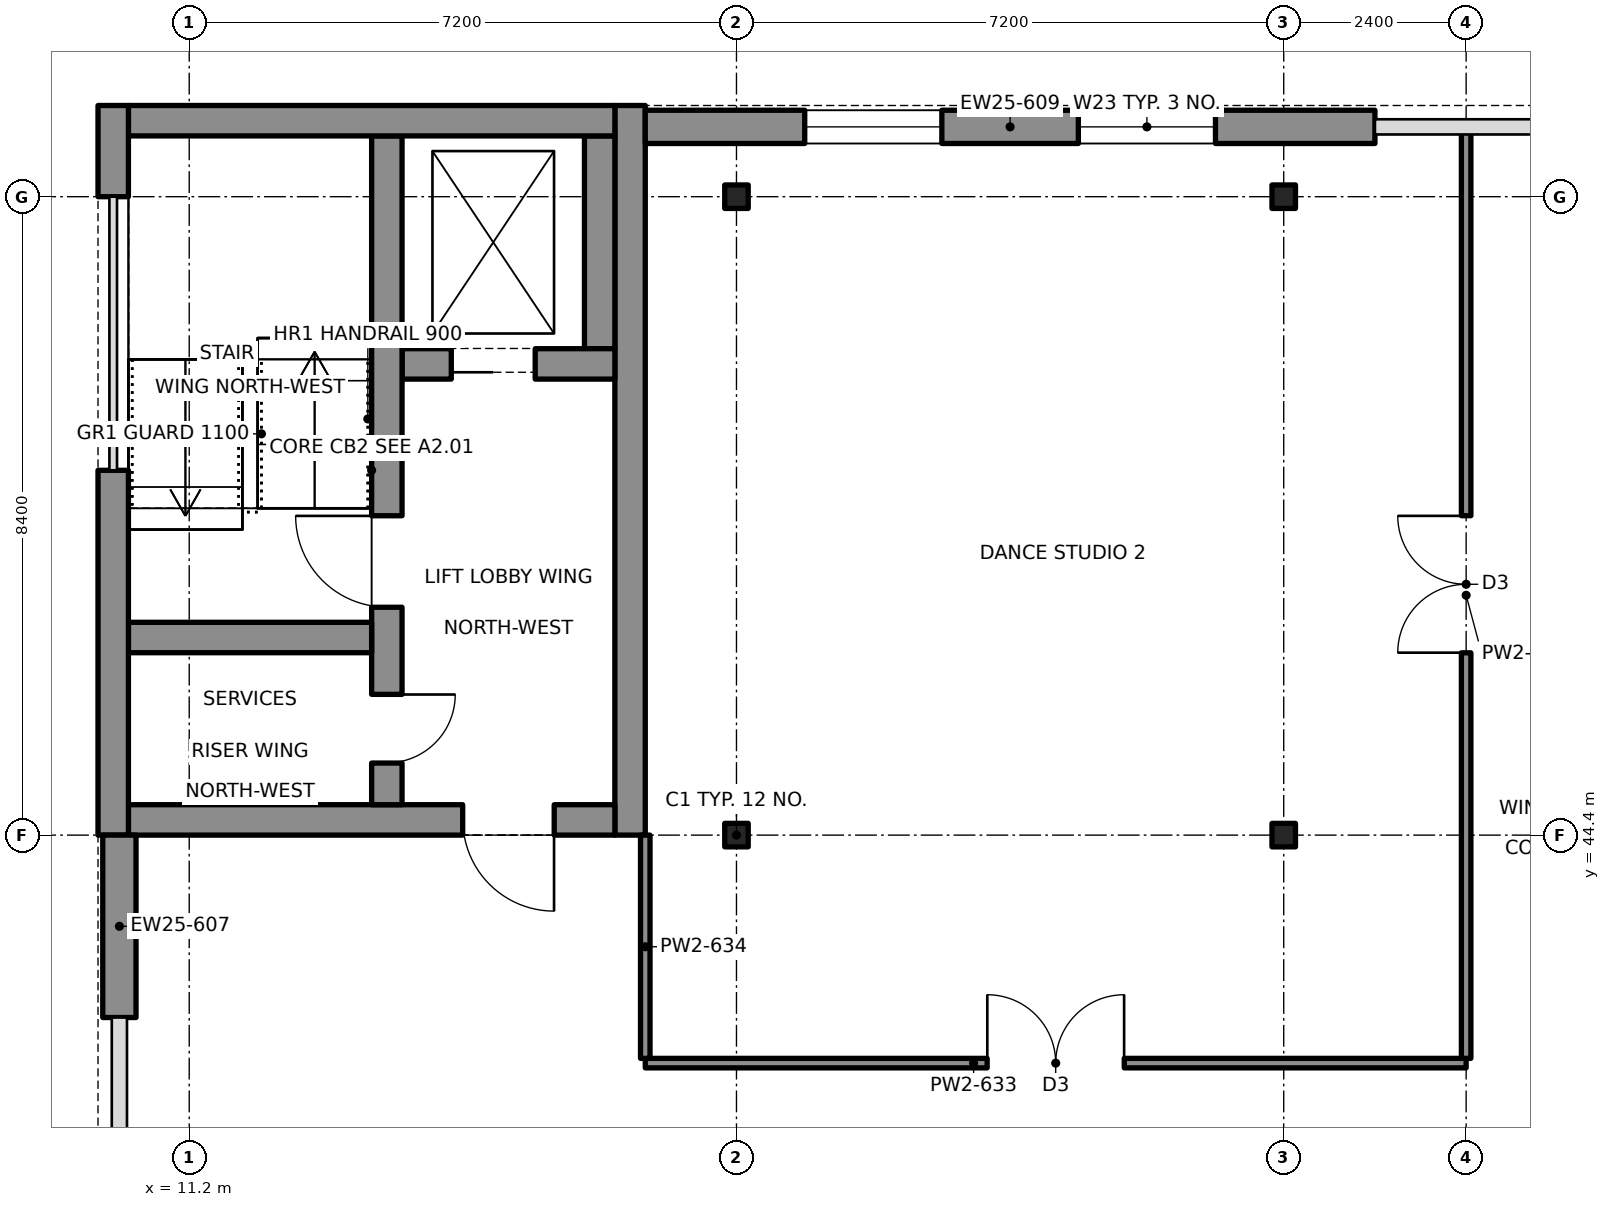
"""IFC4 building model, lengths in metres.
Left out: names, types, materials, properties, quantities, classifications, styles, units other than length and angle.
Written with IfcOpenShell. Run it as: python <this file> out.ifc"""

import sys

from ifc_helpers import new_model, si_unit, direction, frame, frame_2d, origin, origin_2d, place, context, subcontext, project, spatial, rectangle, i_section, extrude, element, fill, save


model = new_model("IFC4")
c1 = context("Model", 3, precision=1e-05, world=origin(), true_north=direction((0.0, 1.0)))
c2 = subcontext(c1, "Body", "Model", "MODEL_VIEW")
j1 = project(units=[si_unit("LENGTHUNIT", "METRE"), si_unit("PLANEANGLEUNIT", "RADIAN")], contexts=[c1])
p1 = place(None, origin())
s1 = spatial("IfcSite", under=j1, at=p1, CompositionType="ELEMENT")
p2 = place(p1, origin())
s2 = spatial("IfcBuilding", under=s1, at=p2, CompositionType="ELEMENT")
p3 = place(p2, frame((0.0, 0.0, 8.8)))
s3 = spatial("IfcBuildingStorey", under=s2, at=p3, CompositionType="ELEMENT", Elevation=8.8)
for number, where, z_axis, x_axis in (
    (1, (18.4, 44.4, 0.0), (0.0, 0.0, 1.0), (1.0, 0.0, 0.0)),
    (2, (18.4, 52.8, 0.0), (0.0, 0.0, 1.0), (1.0, 0.0, 0.0)),
    (3, (25.6, 44.4, 0.0), (0.0, 0.0, 1.0), (1.0, 0.0, 0.0)),
    (4, (25.6, 52.8, 0.0), (0.0, 0.0, 1.0), (1.0, 0.0, 0.0)),
):
    element("IfcColumn", number, at=place(p3, frame(where, z_axis=z_axis, x_axis=x_axis)), inside=s3, PredefinedType="COLUMN", context=c2, shape_type="SweptSolid", body=[
        extrude(i_section(OverallWidth=0.309, OverallDepth=0.323, WebThickness=0.014, FlangeThickness=0.023, at=origin_2d()), origin(), (0.0, 0.0, 1.0), 5.2),
    ])
p4 = place(p3, frame((17.2, 53.719, 0.0), z_axis=(0.0, 0.0, 1.0), x_axis=(1.0, 0.0, 0.0)))
e5 = element("IfcWall", 5, at=p4, inside=s3, PredefinedType="SOLIDWALL", context=c2, shape_type="SweptSolid", body=[
    extrude(rectangle(XDim=9.6, YDim=0.438, at=frame_2d((4.8, 0.0))), origin(), (0.0, 0.0, 1.0), 5.2),
])
p5 = place(p4, frame((2.1, 0.0, 0.8)))
e6 = element("IfcOpeningElement", 6, at=p5, cuts=e5, PredefinedType="OPENING", context=c2, shape_type="SweptSolid", body=[
    extrude(rectangle(XDim=1.8, YDim=3.6, at=frame_2d((0.9, 1.8))), frame((0.0, 0.229, 0.0), z_axis=(0.0, -1.0, 0.0), x_axis=(1.0, 0.0, 0.0)), (0.0, 0.0, 1.0), 0.458),
])
p6 = place(p4, frame((5.7, 0.0, 0.8)))
e7 = element("IfcOpeningElement", 7, at=p6, cuts=e5, PredefinedType="OPENING", context=c2, shape_type="SweptSolid", body=[
    extrude(rectangle(XDim=1.8, YDim=3.6, at=frame_2d((0.9, 1.8))), frame((0.0, 0.229, 0.0), z_axis=(0.0, -1.0, 0.0), x_axis=(1.0, 0.0, 0.0)), (0.0, 0.0, 1.0), 0.458),
])
p7 = place(p3, frame((10.281, 42.0, 0.0), z_axis=(0.0, 0.0, 1.0), x_axis=(0.0, 1.0, 0.0)))
e8 = element("IfcWall", 8, at=p7, inside=s3, PredefinedType="SOLIDWALL", context=c2, shape_type="SweptSolid", body=[
    extrude(rectangle(XDim=2.4, YDim=0.438, at=frame_2d((1.2, 0.0))), origin(), (0.0, 0.0, 1.0), 5.2),
])
p8 = place(p3, frame((10.2, 44.4, 0.0), z_axis=(0.0, 0.0, 1.0), x_axis=(0.0, 1.0, 0.0)))
e9 = element("IfcWall", 9, at=p8, inside=s3, PredefinedType="SHEAR", context=c2, shape_type="SweptSolid", body=[
    extrude(rectangle(XDim=4.8, YDim=0.4, at=frame_2d((2.4, 0.0))), origin(), (0.0, 0.0, 1.0), 5.2),
])
p9 = place(p3, frame((10.2, 52.8, 0.0), z_axis=(0.0, 0.0, 1.0), x_axis=(0.0, 1.0, 0.0)))
e10 = element("IfcWall", 10, at=p9, inside=s3, PredefinedType="SHEAR", context=c2, shape_type="SweptSolid", body=[
    extrude(rectangle(XDim=1.2, YDim=0.4, at=frame_2d((0.6, 0.0))), origin(), (0.0, 0.0, 1.0), 5.2),
])
p10 = place(p3, frame((17.0, 44.4, 0.0), z_axis=(0.0, 0.0, 1.0), x_axis=(0.0, 1.0, 0.0)))
e11 = element("IfcWall", 11, at=p10, inside=s3, PredefinedType="SHEAR", context=c2, shape_type="SweptSolid", body=[
    extrude(rectangle(XDim=9.6, YDim=0.4, at=frame_2d((4.8, 0.0))), origin(), (0.0, 0.0, 1.0), 5.2),
])
p11 = place(p3, frame((10.4, 53.8, 0.0), z_axis=(0.0, 0.0, 1.0), x_axis=(1.0, 0.0, 0.0)))
e12 = element("IfcWall", 12, at=p11, inside=s3, PredefinedType="SHEAR", context=c2, shape_type="SweptSolid", body=[
    extrude(rectangle(XDim=6.4, YDim=0.4, at=frame_2d((3.2, 0.0))), origin(), (0.0, 0.0, 1.0), 5.2),
])
p12 = place(p3, frame((10.4, 44.6, 0.0), z_axis=(0.0, 0.0, 1.0), x_axis=(1.0, 0.0, 0.0)))
e13 = element("IfcWall", 13, at=p12, inside=s3, PredefinedType="SHEAR", context=c2, shape_type="SweptSolid", body=[
    extrude(rectangle(XDim=6.4, YDim=0.4, at=frame_2d((3.2, 0.0))), origin(), (0.0, 0.0, 1.0), 5.2),
])
p13 = place(p12, frame((4.4, 0.0, 0.0)))
e14 = element("IfcOpeningElement", 14, at=p13, cuts=e13, PredefinedType="OPENING", context=c2, shape_type="SweptSolid", body=[
    extrude(rectangle(XDim=1.2, YDim=2.1, at=frame_2d((0.6, 1.05))), frame((0.0, 0.21, 0.0), z_axis=(0.0, -1.0, 0.0), x_axis=(1.0, 0.0, 0.0)), (0.0, 0.0, 1.0), 0.42),
])
p14 = place(p3, frame((13.8, 44.8, 0.0), z_axis=(0.0, 0.0, 1.0), x_axis=(0.0, 1.0, 0.0)))
e15 = element("IfcWall", 15, at=p14, inside=s3, PredefinedType="SHEAR", context=c2, shape_type="SweptSolid", body=[
    extrude(rectangle(XDim=8.8, YDim=0.4, at=frame_2d((4.4, 0.0))), origin(), (0.0, 0.0, 1.0), 5.2),
])
p15 = place(p14, frame((2.6, 0.0, 0.0)))
e16 = element("IfcOpeningElement", 16, at=p15, cuts=e15, PredefinedType="OPENING", context=c2, shape_type="SweptSolid", body=[
    extrude(rectangle(XDim=1.2, YDim=2.1, at=frame_2d((0.6, 1.05))), frame((0.0, 0.21, 0.0), z_axis=(0.0, -1.0, 0.0), x_axis=(1.0, 0.0, 0.0)), (0.0, 0.0, 1.0), 0.42),
])
p16 = place(p14, frame((0.55, 0.0, 0.0)))
e17 = element("IfcOpeningElement", 17, at=p16, cuts=e15, PredefinedType="OPENING", context=c2, shape_type="SweptSolid", body=[
    extrude(rectangle(XDim=0.9, YDim=2.1, at=frame_2d((0.45, 1.05))), frame((0.0, 0.21, 0.0), z_axis=(0.0, -1.0, 0.0), x_axis=(1.0, 0.0, 0.0)), (0.0, 0.0, 1.0), 0.42),
])
p17 = place(p3, frame((10.4, 47.0, 0.0), z_axis=(0.0, 0.0, 1.0), x_axis=(1.0, 0.0, 0.0)))
e18 = element("IfcWall", 18, at=p17, inside=s3, PredefinedType="SHEAR", context=c2, shape_type="SweptSolid", body=[
    extrude(rectangle(XDim=3.2, YDim=0.4, at=frame_2d((1.6, 0.0))), origin(), (0.0, 0.0, 1.0), 5.2),
])
p18 = place(p3, frame((14.0, 50.6, 0.0), z_axis=(0.0, 0.0, 1.0), x_axis=(1.0, 0.0, 0.0)))
e19 = element("IfcWall", 19, at=p18, inside=s3, PredefinedType="SHEAR", context=c2, shape_type="SweptSolid", body=[
    extrude(rectangle(XDim=2.8, YDim=0.4, at=frame_2d((1.4, 0.0))), origin(), (0.0, 0.0, 1.0), 5.2),
])
p19 = place(p18, frame((0.65, 0.0, 0.0)))
e20 = element("IfcOpeningElement", 20, at=p19, cuts=e19, PredefinedType="OPENING", context=c2, shape_type="SweptSolid", body=[
    extrude(rectangle(XDim=1.1, YDim=2.1, at=frame_2d((0.55, 1.05))), frame((0.0, 0.21, 0.0), z_axis=(0.0, -1.0, 0.0), x_axis=(1.0, 0.0, 0.0)), (0.0, 0.0, 1.0), 0.42),
])
p20 = place(p3, frame((16.6, 50.8, 0.0), z_axis=(0.0, 0.0, 1.0), x_axis=(0.0, 1.0, 0.0)))
e21 = element("IfcWall", 21, at=p20, inside=s3, PredefinedType="SHEAR", context=c2, shape_type="SweptSolid", body=[
    extrude(rectangle(XDim=2.8, YDim=0.4, at=frame_2d((1.4, 0.0))), origin(), (0.0, 0.0, 1.0), 5.2),
])
p21 = place(p3, frame((17.2, 41.4, 0.0), z_axis=(0.0, 0.0, 1.0), x_axis=(1.0, 0.0, 0.0)))
e22 = element("IfcWall", 22, at=p21, inside=s3, PredefinedType="PARTITIONING", context=c2, shape_type="SweptSolid", body=[
    extrude(rectangle(XDim=10.8, YDim=0.125, at=frame_2d((5.4, 0.0))), origin(), (0.0, 0.0, 1.0), 4.45),
])
p22 = place(p21, frame((4.5, 0.0, 0.0)))
e23 = element("IfcOpeningElement", 23, at=p22, cuts=e22, PredefinedType="OPENING", context=c2, shape_type="SweptSolid", body=[
    extrude(rectangle(XDim=1.8, YDim=2.1, at=frame_2d((0.9, 1.05))), frame((0.0, 0.073, 0.0), z_axis=(0.0, -1.0, 0.0), x_axis=(1.0, 0.0, 0.0)), (0.0, 0.0, 1.0), 0.145),
])
p23 = place(p3, frame((17.2, 41.462, 0.0), z_axis=(0.0, 0.0, 1.0), x_axis=(0.0, 1.0, 0.0)))
e24 = element("IfcWall", 24, at=p23, inside=s3, PredefinedType="PARTITIONING", context=c2, shape_type="SweptSolid", body=[
    extrude(rectangle(XDim=2.938, YDim=0.125, at=frame_2d((1.469, 0.0))), origin(), (0.0, 0.0, 1.0), 4.45),
])
p24 = place(p3, frame((28.0, 41.462, 0.0), z_axis=(0.0, 0.0, 1.0), x_axis=(0.0, 1.0, 0.0)))
e25 = element("IfcWall", 25, at=p24, inside=s3, PredefinedType="PARTITIONING", context=c2, shape_type="SweptSolid", body=[
    extrude(rectangle(XDim=12.186, YDim=0.125, at=frame_2d((6.093, 0.0))), origin(), (0.0, 0.0, 1.0), 4.45),
])
p25 = place(p24, frame((5.338, 0.0, 0.0)))
e26 = element("IfcOpeningElement", 26, at=p25, cuts=e25, PredefinedType="OPENING", context=c2, shape_type="SweptSolid", body=[
    extrude(rectangle(XDim=1.8, YDim=2.1, at=frame_2d((0.9, 1.05))), frame((0.0, 0.073, 0.0), z_axis=(0.0, -1.0, 0.0), x_axis=(1.0, 0.0, 0.0)), (0.0, 0.0, 1.0), 0.145),
])
p26 = place(p5, origin())
e27 = element("IfcWindow", 27, at=p26, inside=s3, PartitioningType="SINGLE_PANEL", PredefinedType="WINDOW", context=c2, shape_type="SweptSolid", body=[
    extrude(rectangle(XDim=1.8, YDim=3.6, at=frame_2d((0.9, 1.8))), frame((0.0, 0.03, 0.0), z_axis=(0.0, -1.0, 0.0), x_axis=(1.0, 0.0, 0.0)), (0.0, 0.0, 1.0), 0.06),
])
fill(e6, e27)
p27 = place(p6, origin())
e28 = element("IfcWindow", 28, at=p27, inside=s3, PartitioningType="SINGLE_PANEL", PredefinedType="WINDOW", context=c2, shape_type="SweptSolid", body=[
    extrude(rectangle(XDim=1.8, YDim=3.6, at=frame_2d((0.9, 1.8))), frame((0.0, 0.03, 0.0), z_axis=(0.0, -1.0, 0.0), x_axis=(1.0, 0.0, 0.0)), (0.0, 0.0, 1.0), 0.06),
])
fill(e7, e28)
p28 = place(p13, origin())
e29 = element("IfcDoor", 29, at=p28, inside=s3, OperationType="SINGLE_SWING_RIGHT", PredefinedType="DOOR", context=c2, shape_type="SweptSolid", body=[
    extrude(rectangle(XDim=1.2, YDim=2.1, at=frame_2d((0.6, 1.05))), frame((0.0, 0.025, 0.0), z_axis=(0.0, -1.0, 0.0), x_axis=(1.0, 0.0, 0.0)), (0.0, 0.0, 1.0), 0.05),
])
fill(e14, e29)
p29 = place(p15, origin())
e30 = element("IfcDoor", 30, at=p29, inside=s3, OperationType="SINGLE_SWING_RIGHT", PredefinedType="DOOR", context=c2, shape_type="SweptSolid", body=[
    extrude(rectangle(XDim=1.2, YDim=2.1, at=frame_2d((0.6, 1.05))), frame((0.0, 0.025, 0.0), z_axis=(0.0, -1.0, 0.0), x_axis=(1.0, 0.0, 0.0)), (0.0, 0.0, 1.0), 0.05),
])
fill(e16, e30)
p30 = place(p16, origin())
e31 = element("IfcDoor", 31, at=p30, inside=s3, OperationType="SINGLE_SWING_RIGHT", PredefinedType="DOOR", context=c2, shape_type="SweptSolid", body=[
    extrude(rectangle(XDim=0.9, YDim=2.1, at=frame_2d((0.45, 1.05))), frame((0.0, 0.025, 0.0), z_axis=(0.0, -1.0, 0.0), x_axis=(1.0, 0.0, 0.0)), (0.0, 0.0, 1.0), 0.05),
])
fill(e17, e31)
p31 = place(p19, origin())
e32 = element("IfcDoor", 32, at=p31, inside=s3, OperationType="SLIDING_TO_RIGHT", PredefinedType="DOOR", context=c2, shape_type="SweptSolid", body=[
    extrude(rectangle(XDim=1.1, YDim=2.1, at=frame_2d((0.55, 1.05))), frame((0.0, 0.025, 0.0), z_axis=(0.0, -1.0, 0.0), x_axis=(1.0, 0.0, 0.0)), (0.0, 0.0, 1.0), 0.05),
])
fill(e20, e32)
p32 = place(p25, origin())
e33 = element("IfcDoor", 33, at=p32, inside=s3, OperationType="DOUBLE_DOOR_SINGLE_SWING", PredefinedType="DOOR", context=c2, shape_type="SweptSolid", body=[
    extrude(rectangle(XDim=1.8, YDim=2.1, at=frame_2d((0.9, 1.05))), frame((0.0, 0.025, 0.0), z_axis=(0.0, -1.0, 0.0), x_axis=(1.0, 0.0, 0.0)), (0.0, 0.0, 1.0), 0.05),
])
fill(e26, e33)
p33 = place(p22, origin())
e34 = element("IfcDoor", 34, at=p33, inside=s3, OperationType="DOUBLE_DOOR_SINGLE_SWING", PredefinedType="DOOR", context=c2, shape_type="SweptSolid", body=[
    extrude(rectangle(XDim=1.8, YDim=2.1, at=frame_2d((0.9, 1.05))), frame((0.0, 0.025, 0.0), z_axis=(0.0, -1.0, 0.0), x_axis=(1.0, 0.0, 0.0)), (0.0, 0.0, 1.0), 0.05),
])
fill(e23, e34)
save(model, sys.argv[1])
